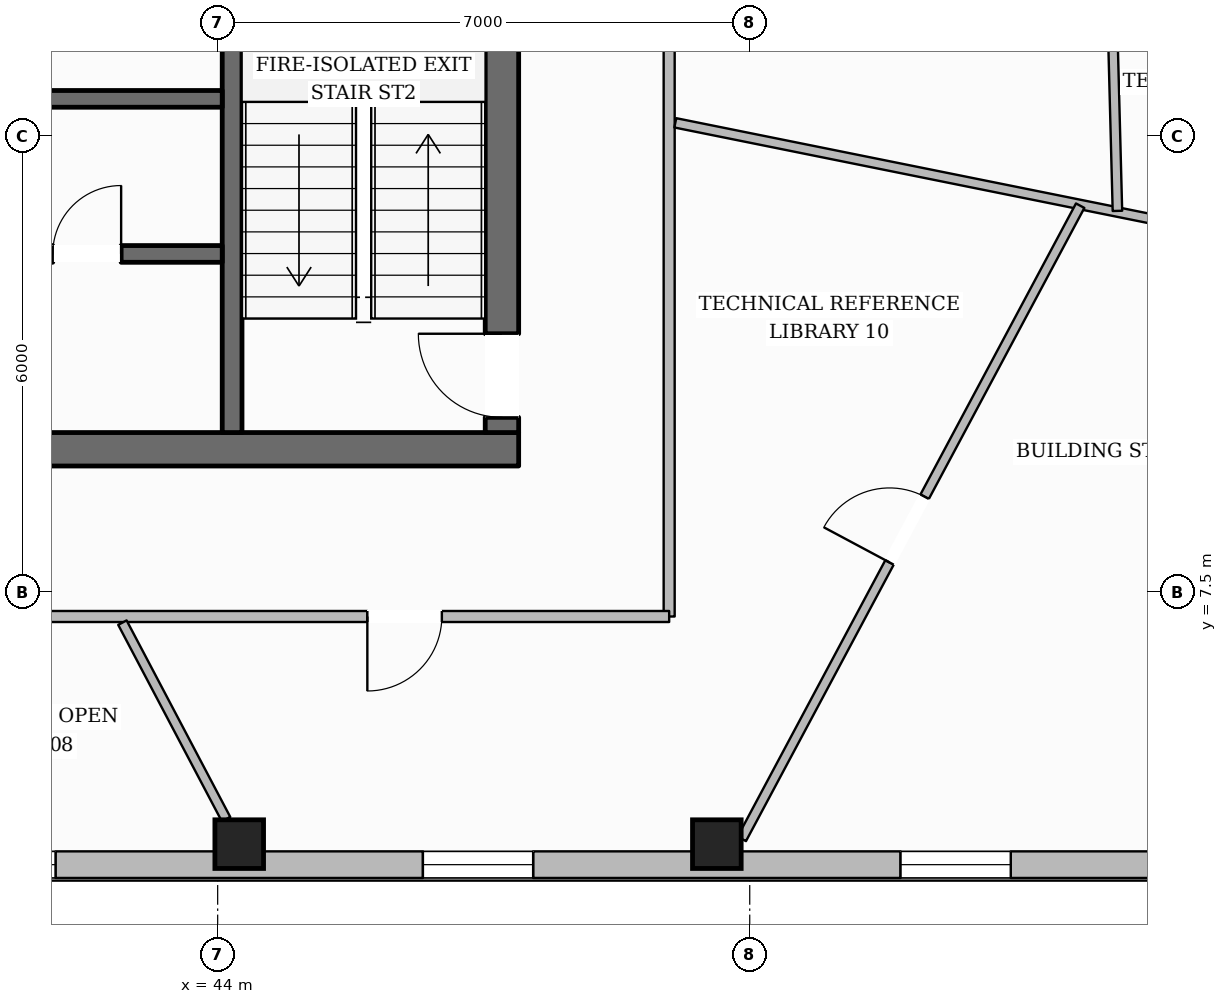
"""IFC4 building model, lengths in metres.
Left out: names, types, materials, properties, quantities, classifications, styles, units other than length and angle.
Written with IfcOpenShell. Run it as: python <this file> out.ifc"""

import sys

from ifc_helpers import new_model, si_unit, direction, frame, frame_2d, origin, origin_2d, place, context, subcontext, project, spatial, rectangle, hollow_rectangle, extrude, element, fill, save


model = new_model("IFC4")
c1 = context("Model", 3, precision=1e-05, world=origin(), true_north=direction((0.0, 1.0)))
c2 = subcontext(c1, "Body", "Model", "MODEL_VIEW")
j1 = project(units=[si_unit("LENGTHUNIT", "METRE"), si_unit("PLANEANGLEUNIT", "RADIAN")], contexts=[c1])
p1 = place(None, origin())
s1 = spatial("IfcSite", under=j1, at=p1, CompositionType="ELEMENT")
p2 = place(p1, origin())
s2 = spatial("IfcBuilding", under=s1, at=p2, CompositionType="ELEMENT")
p3 = place(p2, frame((0.0, 0.0, 203.5)))
s3 = spatial("IfcBuildingStorey", under=s2, at=p3, CompositionType="ELEMENT", Elevation=203.5)
p4 = place(p3, frame((28.04, 9.38, 0.0), z_axis=(0.0, 0.0, 1.0), x_axis=(1.0, 0.0, 0.0)))
e1 = element("IfcWall", 1, at=p4, inside=s3, PredefinedType="SOLIDWALL", context=c2, shape_type="SweptSolid", body=[
    extrude(rectangle(XDim=19.92, YDim=0.44, at=frame_2d((9.96, 0.0))), origin(), (0.0, 0.0, 1.0), 3.6),
])
p5 = place(p4, frame((10.46, 0.0, 0.0)))
e2 = element("IfcOpeningElement", 2, at=p5, cuts=e1, PredefinedType="OPENING", context=c2, shape_type="SweptSolid", body=[
    extrude(rectangle(XDim=1.4, YDim=2.2, at=frame_2d((0.7, 1.1))), frame((0.0, 0.23, 0.0), z_axis=(0.0, -1.0, 0.0), x_axis=(1.0, 0.0, 0.0)), (0.0, 0.0, 1.0), 0.46),
])
p6 = place(p3, frame((47.74, 9.6, 0.0), z_axis=(0.0, 0.0, 1.0), x_axis=(0.0, 1.0, 0.0)))
e3 = element("IfcWall", 3, at=p6, inside=s3, PredefinedType="SOLIDWALL", context=c2, shape_type="SweptSolid", body=[
    extrude(rectangle(XDim=13.0, YDim=0.44, at=frame_2d((6.5, 0.0))), origin(), (0.0, 0.0, 1.0), 3.6),
])
p7 = place(p6, frame((0.2, 0.0, 0.0)))
e4 = element("IfcOpeningElement", 4, at=p7, cuts=e3, PredefinedType="OPENING", context=c2, shape_type="SweptSolid", body=[
    extrude(rectangle(XDim=1.1, YDim=2.15, at=frame_2d((0.55, 1.075))), frame((0.0, 0.23, 0.0), z_axis=(0.0, -1.0, 0.0), x_axis=(1.0, 0.0, 0.0)), (0.0, 0.0, 1.0), 0.46),
])
p8 = place(p6, frame((8.4, 0.0, 0.0)))
e5 = element("IfcOpeningElement", 5, at=p8, cuts=e3, PredefinedType="OPENING", context=c2, shape_type="SweptSolid", body=[
    extrude(rectangle(XDim=0.9, YDim=2.1, at=frame_2d((0.45, 1.05))), frame((0.0, 0.23, 0.0), z_axis=(0.0, -1.0, 0.0), x_axis=(1.0, 0.0, 0.0)), (0.0, 0.0, 1.0), 0.46),
])
p9 = place(p3, frame((44.19, 9.6, 0.0), z_axis=(0.0, 0.0, 1.0), x_axis=(0.0, 1.0, 0.0)))
e6 = element("IfcWall", 6, at=p9, inside=s3, PredefinedType="SHEAR", context=c2, shape_type="SweptSolid", body=[
    extrude(rectangle(XDim=13.0, YDim=0.26, at=frame_2d((6.5, 0.0))), origin(), (0.0, 0.0, 1.0), 3.6),
])
p10 = place(p9, frame((10.925, 0.0, 0.0)))
e7 = element("IfcOpeningElement", 7, at=p10, cuts=e6, PredefinedType="OPENING", context=c2, shape_type="SweptSolid", body=[
    extrude(rectangle(XDim=1.25, YDim=2.25, at=frame_2d((0.625, 1.125))), frame((0.0, 0.14, 0.0), z_axis=(0.0, -1.0, 0.0), x_axis=(1.0, 0.0, 0.0)), (0.0, 0.0, 1.0), 0.28),
])
p11 = place(p3, frame((31.94, 13.99, 0.0), z_axis=(0.0, 0.0, 1.0), x_axis=(1.0, 0.0, 0.0)))
e8 = element("IfcWall", 8, at=p11, inside=s3, PredefinedType="SOLIDWALL", context=c2, shape_type="SweptSolid", body=[
    extrude(rectangle(XDim=12.12, YDim=0.22, at=frame_2d((6.06, 0.0))), origin(), (0.0, 0.0, 1.0), 3.6),
])
p12 = place(p11, frame((1.91, 0.0, 0.0)))
e9 = element("IfcOpeningElement", 9, at=p12, cuts=e8, PredefinedType="OPENING", context=c2, shape_type="SweptSolid", body=[
    extrude(rectangle(XDim=0.9, YDim=2.1, at=frame_2d((0.45, 1.05))), frame((0.0, 0.12, 0.0), z_axis=(0.0, -1.0, 0.0), x_axis=(1.0, 0.0, 0.0)), (0.0, 0.0, 1.0), 0.24),
])
p13 = place(p11, frame((7.95, 0.0, 0.0)))
e10 = element("IfcOpeningElement", 10, at=p13, cuts=e8, PredefinedType="OPENING", context=c2, shape_type="SweptSolid", body=[
    extrude(rectangle(XDim=1.02, YDim=2.15, at=frame_2d((0.51, 1.075))), frame((0.0, 0.12, 0.0), z_axis=(0.0, -1.0, 0.0), x_axis=(1.0, 0.0, 0.0)), (0.0, 0.0, 1.0), 0.24),
])
p14 = place(p3, frame((40.28, 11.95, 0.0), z_axis=(0.0, 0.0, 1.0), x_axis=(1.0, 0.0, 0.0)))
e11 = element("IfcWall", 11, at=p14, inside=s3, PredefinedType="SOLIDWALL", context=c2, shape_type="SweptSolid", body=[
    extrude(rectangle(XDim=3.78, YDim=0.22, at=frame_2d((1.89, 0.0))), origin(), (0.0, 0.0, 1.0), 3.6),
])
p15 = place(p14, frame((1.55, 0.0, 0.0)))
e12 = element("IfcOpeningElement", 12, at=p15, cuts=e11, PredefinedType="OPENING", context=c2, shape_type="SweptSolid", body=[
    extrude(rectangle(XDim=0.9, YDim=2.1, at=frame_2d((0.45, 1.05))), frame((0.0, 0.12, 0.0), z_axis=(0.0, -1.0, 0.0), x_axis=(1.0, 0.0, 0.0)), (0.0, 0.0, 1.0), 0.24),
])
for number, where, z_axis, x_axis in (
    (13, (44.284, 4.185, 0.0), (0.0, 0.0, 1.0), (1.0, 0.0, 0.0)),
    (14, (50.567, 4.185, 0.0), (0.0, 0.0, 1.0), (1.0, 0.0, 0.0)),
):
    element("IfcColumn", number, at=place(p3, frame(where, z_axis=z_axis, x_axis=x_axis)), inside=s3, PredefinedType="COLUMN", context=c2, shape_type="SweptSolid", body=[
        extrude(hollow_rectangle(XDim=0.64, YDim=0.64, WallThickness=0.028, at=origin_2d()), origin(), (0.0, 0.0, 1.0), 3.6),
    ])
p16 = place(p3, frame((57.325, 3.915, 0.0), z_axis=(0.0, 0.0, 1.0), x_axis=(-1.0, 0.0, 0.0)))
e15 = element("IfcWall", 15, at=p16, inside=s3, PredefinedType="STANDARD", context=c2, shape_type="SweptSolid", body=[
    extrude(rectangle(XDim=38.651, YDim=0.35, at=frame_2d((19.325, 0.0))), origin(), (0.0, 0.0, 1.0), 3.132),
])
p17 = place(p16, frame((34.31, 0.0, 0.65)))
e16 = element("IfcOpeningElement", 16, at=p17, cuts=e15, PredefinedType="OPENING", context=c2, shape_type="SweptSolid", body=[
    extrude(rectangle(XDim=1.45, YDim=1.75, at=frame_2d((0.725, 0.875))), frame((0.0, 0.185, 0.0), z_axis=(0.0, -1.0, 0.0), x_axis=(1.0, 0.0, 0.0)), (0.0, 0.0, 1.0), 0.37),
])
p18 = place(p16, frame((28.026, 0.0, 0.65)))
e17 = element("IfcOpeningElement", 17, at=p18, cuts=e15, PredefinedType="OPENING", context=c2, shape_type="SweptSolid", body=[
    extrude(rectangle(XDim=1.45, YDim=1.75, at=frame_2d((0.725, 0.875))), frame((0.0, 0.185, 0.0), z_axis=(0.0, -1.0, 0.0), x_axis=(1.0, 0.0, 0.0)), (0.0, 0.0, 1.0), 0.37),
])
p19 = place(p16, frame((15.458, 0.0, 0.65)))
e18 = element("IfcOpeningElement", 18, at=p19, cuts=e15, PredefinedType="OPENING", context=c2, shape_type="SweptSolid", body=[
    extrude(rectangle(XDim=1.45, YDim=1.75, at=frame_2d((0.725, 0.875))), frame((0.0, 0.185, 0.0), z_axis=(0.0, -1.0, 0.0), x_axis=(1.0, 0.0, 0.0)), (0.0, 0.0, 1.0), 0.37),
])
p20 = place(p16, frame((9.175, 0.0, 0.65)))
e19 = element("IfcOpeningElement", 19, at=p20, cuts=e15, PredefinedType="OPENING", context=c2, shape_type="SweptSolid", body=[
    extrude(rectangle(XDim=1.45, YDim=1.75, at=frame_2d((0.725, 0.875))), frame((0.0, 0.185, 0.0), z_axis=(0.0, -1.0, 0.0), x_axis=(1.0, 0.0, 0.0)), (0.0, 0.0, 1.0), 0.37),
])
p21 = place(p16, frame((2.891, 0.0, 0.65)))
e20 = element("IfcOpeningElement", 20, at=p21, cuts=e15, PredefinedType="OPENING", context=c2, shape_type="SweptSolid", body=[
    extrude(rectangle(XDim=1.45, YDim=1.75, at=frame_2d((0.725, 0.875))), frame((0.0, 0.185, 0.0), z_axis=(0.0, -1.0, 0.0), x_axis=(1.0, 0.0, 0.0)), (0.0, 0.0, 1.0), 0.37),
])
p22 = place(p3, frame((42.267, 44.004, 0.0), z_axis=(0.0, 0.0, 1.0), x_axis=(0.507147779291, -0.861859112593, 0.0)))
e21 = element("IfcWall", 21, at=p22, inside=s3, PredefinedType="STANDARD", context=c2, shape_type="SweptSolid", body=[
    extrude(rectangle(XDim=38.111, YDim=0.35, at=frame_2d((19.056, 0.0))), origin(), (0.0, 0.0, 1.0), 3.132),
])
p23 = place(p22, frame((33.808, 0.0, 0.65)))
e22 = element("IfcOpeningElement", 22, at=p23, cuts=e21, PredefinedType="OPENING", context=c2, shape_type="SweptSolid", body=[
    extrude(rectangle(XDim=1.45, YDim=1.75, at=frame_2d((0.725, 0.875))), frame((0.0, 0.185, 0.0), z_axis=(0.0, -1.0, 0.0), x_axis=(1.0, 0.0, 0.0)), (0.0, 0.0, 1.0), 0.37),
])
p24 = place(p22, frame((27.615, 0.0, 0.65)))
e23 = element("IfcOpeningElement", 23, at=p24, cuts=e21, PredefinedType="OPENING", context=c2, shape_type="SweptSolid", body=[
    extrude(rectangle(XDim=1.45, YDim=1.75, at=frame_2d((0.725, 0.875))), frame((0.0, 0.185, 0.0), z_axis=(0.0, -1.0, 0.0), x_axis=(1.0, 0.0, 0.0)), (0.0, 0.0, 1.0), 0.37),
])
p25 = place(p22, frame((15.231, 0.0, 0.65)))
e24 = element("IfcOpeningElement", 24, at=p25, cuts=e21, PredefinedType="OPENING", context=c2, shape_type="SweptSolid", body=[
    extrude(rectangle(XDim=1.45, YDim=1.75, at=frame_2d((0.725, 0.875))), frame((0.0, 0.185, 0.0), z_axis=(0.0, -1.0, 0.0), x_axis=(1.0, 0.0, 0.0)), (0.0, 0.0, 1.0), 0.37),
])
p26 = place(p22, frame((9.038, 0.0, 0.65)))
e25 = element("IfcOpeningElement", 25, at=p26, cuts=e21, PredefinedType="OPENING", context=c2, shape_type="SweptSolid", body=[
    extrude(rectangle(XDim=1.45, YDim=1.75, at=frame_2d((0.725, 0.875))), frame((0.0, 0.185, 0.0), z_axis=(0.0, -1.0, 0.0), x_axis=(1.0, 0.0, 0.0)), (0.0, 0.0, 1.0), 0.37),
])
p27 = place(p22, frame((2.846, 0.0, 0.65)))
e26 = element("IfcOpeningElement", 26, at=p27, cuts=e21, PredefinedType="OPENING", context=c2, shape_type="SweptSolid", body=[
    extrude(rectangle(XDim=1.45, YDim=1.75, at=frame_2d((0.725, 0.875))), frame((0.0, 0.185, 0.0), z_axis=(0.0, -1.0, 0.0), x_axis=(1.0, 0.0, 0.0)), (0.0, 0.0, 1.0), 0.37),
])
p28 = place(p3, frame((49.94, 15.1, 0.0), z_axis=(0.0, 0.0, 1.0), x_axis=(0.0, -1.0, 0.0)))
e27 = element("IfcWall", 27, at=p28, inside=s3, PredefinedType="PARTITIONING", context=c2, shape_type="SweptSolid", body=[
    extrude(rectangle(XDim=7.92, YDim=0.145, at=frame_2d((3.96, 0.0))), origin(), (0.0, 0.0, 1.0), 3.6),
])
p29 = place(p3, frame((49.94, 7.18, 0.0), z_axis=(0.0, 0.0, 1.0), x_axis=(-1.0, 0.0, 0.0)))
e28 = element("IfcWall", 28, at=p29, inside=s3, PredefinedType="PARTITIONING", context=c2, shape_type="SweptSolid", body=[
    extrude(rectangle(XDim=23.88, YDim=0.145, at=frame_2d((11.94, 0.0))), origin(), (0.0, 0.0, 1.0), 3.6),
])
p30 = place(p29, frame((12.995, 0.0, 0.0)))
e29 = element("IfcOpeningElement", 29, at=p30, cuts=e28, PredefinedType="OPENING", context=c2, shape_type="SweptSolid", body=[
    extrude(rectangle(XDim=0.98, YDim=2.15, at=frame_2d((0.49, 1.075))), frame((0.0, 0.083, 0.0), z_axis=(0.0, -1.0, 0.0), x_axis=(1.0, 0.0, 0.0)), (0.0, 0.0, 1.0), 0.165),
])
p31 = place(p29, frame((2.991, 0.0, 0.0)))
e30 = element("IfcOpeningElement", 30, at=p31, cuts=e28, PredefinedType="OPENING", context=c2, shape_type="SweptSolid", body=[
    extrude(rectangle(XDim=0.98, YDim=2.15, at=frame_2d((0.49, 1.075))), frame((0.0, 0.083, 0.0), z_axis=(0.0, -1.0, 0.0), x_axis=(1.0, 0.0, 0.0)), (0.0, 0.0, 1.0), 0.165),
])
p32 = place(p3, frame((42.747, 7.1, 0.0), z_axis=(0.0, 0.0, 1.0), x_axis=(0.466479242613, -0.88453214538, 0.0)))
e31 = element("IfcWall", 31, at=p32, inside=s3, PredefinedType="PARTITIONING", context=c2, shape_type="SweptSolid", body=[
    extrude(rectangle(XDim=2.924, YDim=0.125, at=frame_2d((1.462, 0.0))), origin(), (0.0, 0.0, 1.0), 3.6),
])
p33 = place(p3, frame((50.021, 13.675, 0.0), z_axis=(0.0, 0.0, 1.0), x_axis=(0.980243093282, -0.197796557281, 0.0)))
e32 = element("IfcWall", 32, at=p33, inside=s3, PredefinedType="PARTITIONING", context=c2, shape_type="SweptSolid", body=[
    extrude(rectangle(XDim=11.006, YDim=0.125, at=frame_2d((5.503, 0.0))), origin(), (0.0, 0.0, 1.0), 3.141),
])
p34 = place(p3, frame((55.837, 12.516, 0.0), z_axis=(0.0, 0.0, 1.0), x_axis=(-0.026217670577, 0.999656257795, 0.0)))
e33 = element("IfcWall", 33, at=p34, inside=s3, PredefinedType="PARTITIONING", context=c2, shape_type="SweptSolid", body=[
    extrude(rectangle(XDim=8.511, YDim=0.125, at=frame_2d((4.256, 0.0))), origin(), (0.0, 0.0, 1.0), 3.135),
])
p35 = place(p34, frame((4.752, 0.0, 0.0)))
e34 = element("IfcOpeningElement", 34, at=p35, cuts=e33, PredefinedType="OPENING", context=c2, shape_type="SweptSolid", body=[
    extrude(rectangle(XDim=0.98, YDim=2.15, at=frame_2d((0.49, 1.075))), frame((0.0, 0.073, 0.0), z_axis=(0.0, -1.0, 0.0), x_axis=(1.0, 0.0, 0.0)), (0.0, 0.0, 1.0), 0.145),
])
p36 = place(p3, frame((50.895, 4.254, 0.0), z_axis=(0.0, 0.0, 1.0), x_axis=(0.471344688788, 0.88194908263, 0.0)))
e35 = element("IfcWall", 35, at=p36, inside=s3, PredefinedType="PARTITIONING", context=c2, shape_type="SweptSolid", body=[
    extrude(rectangle(XDim=9.446, YDim=0.125, at=frame_2d((4.723, 0.0))), origin(), (0.0, 0.0, 1.0), 3.339),
])
p37 = place(p36, frame((4.125, 0.0, 0.0)))
e36 = element("IfcOpeningElement", 36, at=p37, cuts=e35, PredefinedType="OPENING", context=c2, shape_type="SweptSolid", body=[
    extrude(rectangle(XDim=0.98, YDim=2.15, at=frame_2d((0.49, 1.075))), frame((0.0, 0.073, 0.0), z_axis=(0.0, -1.0, 0.0), x_axis=(1.0, 0.0, 0.0)), (0.0, 0.0, 1.0), 0.145),
])
p38 = place(p19, origin())
e37 = element("IfcWindow", 37, at=p38, inside=s3, PartitioningType="SINGLE_PANEL", PredefinedType="WINDOW", context=c2, shape_type="SweptSolid", body=[
    extrude(rectangle(XDim=1.45, YDim=1.75, at=frame_2d((0.725, 0.875))), frame((0.0, 0.03, 0.0), z_axis=(0.0, -1.0, 0.0), x_axis=(1.0, 0.0, 0.0)), (0.0, 0.0, 1.0), 0.06),
])
fill(e18, e37)
p39 = place(p20, origin())
e38 = element("IfcWindow", 38, at=p39, inside=s3, PartitioningType="SINGLE_PANEL", PredefinedType="WINDOW", context=c2, shape_type="SweptSolid", body=[
    extrude(rectangle(XDim=1.45, YDim=1.75, at=frame_2d((0.725, 0.875))), frame((0.0, 0.03, 0.0), z_axis=(0.0, -1.0, 0.0), x_axis=(1.0, 0.0, 0.0)), (0.0, 0.0, 1.0), 0.06),
])
fill(e19, e38)
p40 = place(p21, origin())
e39 = element("IfcWindow", 39, at=p40, inside=s3, PartitioningType="SINGLE_PANEL", PredefinedType="WINDOW", context=c2, shape_type="SweptSolid", body=[
    extrude(rectangle(XDim=1.45, YDim=1.75, at=frame_2d((0.725, 0.875))), frame((0.0, 0.03, 0.0), z_axis=(0.0, -1.0, 0.0), x_axis=(1.0, 0.0, 0.0)), (0.0, 0.0, 1.0), 0.06),
])
fill(e20, e39)
p41 = place(p7, origin())
e40 = element("IfcDoor", 40, at=p41, inside=s3, OperationType="SINGLE_SWING_RIGHT", PredefinedType="DOOR", context=c2, shape_type="SweptSolid", body=[
    extrude(rectangle(XDim=1.1, YDim=2.15, at=frame_2d((0.55, 1.075))), frame((0.0, 0.025, 0.0), z_axis=(0.0, -1.0, 0.0), x_axis=(1.0, 0.0, 0.0)), (0.0, 0.0, 1.0), 0.05),
])
fill(e4, e40)
p42 = place(p15, origin())
e41 = element("IfcDoor", 41, at=p42, inside=s3, OperationType="SINGLE_SWING_RIGHT", PredefinedType="DOOR", context=c2, shape_type="SweptSolid", body=[
    extrude(rectangle(XDim=0.9, YDim=2.1, at=frame_2d((0.45, 1.05))), frame((0.0, 0.025, 0.0), z_axis=(0.0, -1.0, 0.0), x_axis=(1.0, 0.0, 0.0)), (0.0, 0.0, 1.0), 0.05),
])
fill(e12, e41)
p43 = place(p31, origin())
e42 = element("IfcDoor", 42, at=p43, inside=s3, OperationType="SINGLE_SWING_RIGHT", PredefinedType="DOOR", context=c2, shape_type="SweptSolid", body=[
    extrude(rectangle(XDim=0.98, YDim=2.15, at=frame_2d((0.49, 1.075))), frame((0.0, 0.025, 0.0), z_axis=(0.0, -1.0, 0.0), x_axis=(1.0, 0.0, 0.0)), (0.0, 0.0, 1.0), 0.05),
])
fill(e30, e42)
p44 = place(p37, origin())
e43 = element("IfcDoor", 43, at=p44, inside=s3, OperationType="SINGLE_SWING_LEFT", PredefinedType="DOOR", context=c2, shape_type="SweptSolid", body=[
    extrude(rectangle(XDim=0.98, YDim=2.15, at=frame_2d((0.49, 1.075))), frame((0.0, 0.025, 0.0), z_axis=(0.0, -1.0, 0.0), x_axis=(1.0, 0.0, 0.0)), (0.0, 0.0, 1.0), 0.05),
])
fill(e36, e43)
save(model, sys.argv[1])
